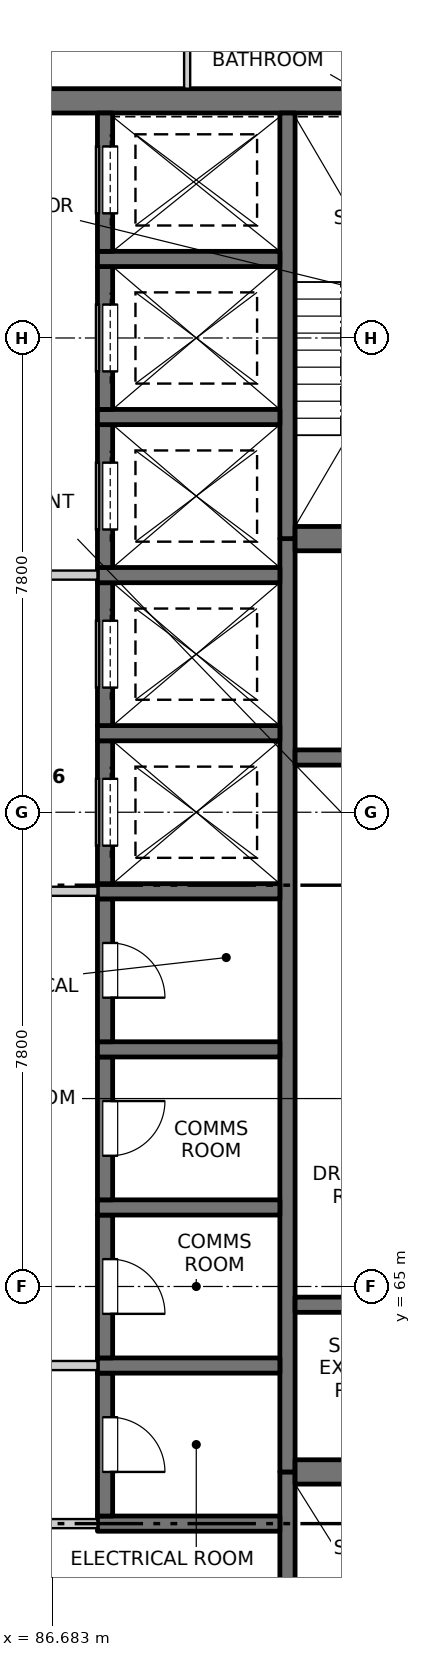
"""IFC4 building model, lengths in metres.
Left out: names, types, materials, properties, quantities, classifications, styles, units other than length and angle.
Written with IfcOpenShell. Run it as: python <this file> out.ifc"""

import sys

from ifc_helpers import new_model, si_unit, direction, frame, frame_2d, origin, place, context, subcontext, project, spatial, rectangle, extrude, element, fill, save


model = new_model("IFC4")
c1 = context("Model", 3, precision=1e-05, world=origin(), true_north=direction((0.0, 1.0)))
c2 = subcontext(c1, "Body", "Model", "MODEL_VIEW")
j1 = project(units=[si_unit("LENGTHUNIT", "METRE"), si_unit("PLANEANGLEUNIT", "RADIAN")], contexts=[c1])
p1 = place(None, origin())
s1 = spatial("IfcSite", under=j1, at=p1, CompositionType="ELEMENT")
p2 = place(p1, origin())
s2 = spatial("IfcBuilding", under=s1, at=p2, CompositionType="ELEMENT")
p3 = place(p2, frame((0.0, 0.0, 238.1)))
s3 = spatial("IfcBuildingStorey", under=s2, at=p3, CompositionType="ELEMENT", Elevation=238.1)
p4 = place(p3, frame((75.45, 84.5, -0.25), z_axis=(0.0, 0.0, 1.0), x_axis=(1.0, 0.0, 0.0)))
e1 = element("IfcWall", 1, at=p4, inside=s3, PredefinedType="SOLIDWALL", context=c2, shape_type="SweptSolid", body=[
    extrude(rectangle(XDim=19.1, YDim=0.4, at=frame_2d((9.55, 0.0))), origin(), (0.0, 0.0, 1.0), 3.35),
])
p5 = place(p3, frame((90.55, 55.45, -0.25), z_axis=(0.0, 0.0, 1.0), x_axis=(0.0, 1.0, 0.0)))
e2 = element("IfcWall", 2, at=p5, inside=s3, PredefinedType="SOLIDWALL", context=c2, shape_type="SweptSolid", body=[
    extrude(rectangle(XDim=6.5, YDim=0.25, at=frame_2d((3.25, 0.0))), origin(), (0.0, 0.0, 1.0), 3.35),
])
p6 = place(p3, frame((90.55, 61.95, -0.25), z_axis=(0.0, 0.0, 1.0), x_axis=(0.0, 1.0, 0.0)))
e3 = element("IfcWall", 3, at=p6, inside=s3, PredefinedType="SOLIDWALL", context=c2, shape_type="SweptSolid", body=[
    extrude(rectangle(XDim=15.35, YDim=0.25, at=frame_2d((7.675, 0.0))), origin(), (0.0, 0.0, 1.0), 3.35),
])
p7 = place(p3, frame((90.55, 77.3, -0.25), z_axis=(0.0, 0.0, 1.0), x_axis=(0.0, 1.0, 0.0)))
e4 = element("IfcWall", 4, at=p7, inside=s3, PredefinedType="SOLIDWALL", context=c2, shape_type="SweptSolid", body=[
    extrude(rectangle(XDim=7.0, YDim=0.25, at=frame_2d((3.5, 0.0))), origin(), (0.0, 0.0, 1.0), 3.35),
])
p8 = place(p3, frame((87.425, 61.1, -0.25), z_axis=(0.0, 0.0, 1.0), x_axis=(1.0, 0.0, 0.0)))
e5 = element("IfcWall", 5, at=p8, inside=s3, PredefinedType="SOLIDWALL", context=c2, shape_type="SweptSolid", body=[
    extrude(rectangle(XDim=3.0, YDim=0.25, at=frame_2d((1.5, 0.0))), origin(), (0.0, 0.0, 1.0), 3.35),
])
p9 = place(p3, frame((87.55, 61.225, -0.25), z_axis=(0.0, 0.0, 1.0), x_axis=(0.0, 1.0, 0.0)))
e6 = element("IfcWall", 6, at=p9, inside=s3, PredefinedType="SOLIDWALL", context=c2, shape_type="SweptSolid", body=[
    extrude(rectangle(XDim=2.35, YDim=0.25, at=frame_2d((1.175, 0.0))), origin(), (0.0, 0.0, 1.0), 3.35),
])
p10 = place(p9, frame((0.725, 0.0, 0.25)))
e7 = element("IfcOpeningElement", 7, at=p10, cuts=e6, PredefinedType="OPENING", context=c2, shape_type="SweptSolid", body=[
    extrude(rectangle(XDim=0.9, YDim=2.1, at=frame_2d((0.45, 1.05))), frame((0.0, 0.135, 0.0), z_axis=(0.0, -1.0, 0.0), x_axis=(1.0, 0.0, 0.0)), (0.0, 0.0, 1.0), 0.27),
])
p11 = place(p3, frame((87.425, 63.7, -0.25), z_axis=(0.0, 0.0, 1.0), x_axis=(1.0, 0.0, 0.0)))
e8 = element("IfcWall", 8, at=p11, inside=s3, PredefinedType="SOLIDWALL", context=c2, shape_type="SweptSolid", body=[
    extrude(rectangle(XDim=3.0, YDim=0.25, at=frame_2d((1.5, 0.0))), origin(), (0.0, 0.0, 1.0), 3.35),
])
p12 = place(p3, frame((87.55, 63.825, -0.25), z_axis=(0.0, 0.0, 1.0), x_axis=(0.0, 1.0, 0.0)))
e9 = element("IfcWall", 9, at=p12, inside=s3, PredefinedType="SOLIDWALL", context=c2, shape_type="SweptSolid", body=[
    extrude(rectangle(XDim=2.35, YDim=0.25, at=frame_2d((1.175, 0.0))), origin(), (0.0, 0.0, 1.0), 3.35),
])
p13 = place(p12, frame((0.725, 0.0, 0.25)))
e10 = element("IfcOpeningElement", 10, at=p13, cuts=e9, PredefinedType="OPENING", context=c2, shape_type="SweptSolid", body=[
    extrude(rectangle(XDim=0.9, YDim=2.1, at=frame_2d((0.45, 1.05))), frame((0.0, 0.135, 0.0), z_axis=(0.0, -1.0, 0.0), x_axis=(1.0, 0.0, 0.0)), (0.0, 0.0, 1.0), 0.27),
])
p14 = place(p3, frame((87.425, 66.3, -0.25), z_axis=(0.0, 0.0, 1.0), x_axis=(1.0, 0.0, 0.0)))
e11 = element("IfcWall", 11, at=p14, inside=s3, PredefinedType="SOLIDWALL", context=c2, shape_type="SweptSolid", body=[
    extrude(rectangle(XDim=3.0, YDim=0.25, at=frame_2d((1.5, 0.0))), origin(), (0.0, 0.0, 1.0), 3.35),
])
p15 = place(p3, frame((87.55, 66.425, -0.25), z_axis=(0.0, 0.0, 1.0), x_axis=(0.0, 1.0, 0.0)))
e12 = element("IfcWall", 12, at=p15, inside=s3, PredefinedType="SOLIDWALL", context=c2, shape_type="SweptSolid", body=[
    extrude(rectangle(XDim=2.35, YDim=0.25, at=frame_2d((1.175, 0.0))), origin(), (0.0, 0.0, 1.0), 3.35),
])
p16 = place(p15, frame((0.725, 0.0, 0.25)))
e13 = element("IfcOpeningElement", 13, at=p16, cuts=e12, PredefinedType="OPENING", context=c2, shape_type="SweptSolid", body=[
    extrude(rectangle(XDim=0.9, YDim=2.1, at=frame_2d((0.45, 1.05))), frame((0.0, 0.135, 0.0), z_axis=(0.0, -1.0, 0.0), x_axis=(1.0, 0.0, 0.0)), (0.0, 0.0, 1.0), 0.27),
])
p17 = place(p3, frame((87.425, 68.9, -0.25), z_axis=(0.0, 0.0, 1.0), x_axis=(1.0, 0.0, 0.0)))
e14 = element("IfcWall", 14, at=p17, inside=s3, PredefinedType="SOLIDWALL", context=c2, shape_type="SweptSolid", body=[
    extrude(rectangle(XDim=3.0, YDim=0.25, at=frame_2d((1.5, 0.0))), origin(), (0.0, 0.0, 1.0), 3.35),
])
p18 = place(p3, frame((87.55, 69.025, -0.25), z_axis=(0.0, 0.0, 1.0), x_axis=(0.0, 1.0, 0.0)))
e15 = element("IfcWall", 15, at=p18, inside=s3, PredefinedType="SOLIDWALL", context=c2, shape_type="SweptSolid", body=[
    extrude(rectangle(XDim=2.35, YDim=0.25, at=frame_2d((1.175, 0.0))), origin(), (0.0, 0.0, 1.0), 3.35),
])
p19 = place(p18, frame((0.725, 0.0, 0.25)))
e16 = element("IfcOpeningElement", 16, at=p19, cuts=e15, PredefinedType="OPENING", context=c2, shape_type="SweptSolid", body=[
    extrude(rectangle(XDim=0.9, YDim=2.1, at=frame_2d((0.45, 1.05))), frame((0.0, 0.135, 0.0), z_axis=(0.0, -1.0, 0.0), x_axis=(1.0, 0.0, 0.0)), (0.0, 0.0, 1.0), 0.27),
])
p20 = place(p3, frame((87.425, 71.5, -0.25), z_axis=(0.0, 0.0, 1.0), x_axis=(1.0, 0.0, 0.0)))
e17 = element("IfcWall", 17, at=p20, inside=s3, PredefinedType="SOLIDWALL", context=c2, shape_type="SweptSolid", body=[
    extrude(rectangle(XDim=3.0, YDim=0.25, at=frame_2d((1.5, 0.0))), origin(), (0.0, 0.0, 1.0), 3.35),
])
p21 = place(p3, frame((87.55, 71.625, -0.25), z_axis=(0.0, 0.0, 1.0), x_axis=(0.0, 1.0, 0.0)))
e18 = element("IfcWall", 18, at=p21, inside=s3, PredefinedType="SOLIDWALL", context=c2, shape_type="SweptSolid", body=[
    extrude(rectangle(XDim=2.35, YDim=0.25, at=frame_2d((1.175, 0.0))), origin(), (0.0, 0.0, 1.0), 3.35),
])
p22 = place(p21, frame((0.625, 0.0, 0.25)))
e19 = element("IfcOpeningElement", 19, at=p22, cuts=e18, PredefinedType="OPENING", context=c2, shape_type="SweptSolid", body=[
    extrude(rectangle(XDim=1.1, YDim=2.1, at=frame_2d((0.55, 1.05))), frame((0.0, 0.135, 0.0), z_axis=(0.0, -1.0, 0.0), x_axis=(1.0, 0.0, 0.0)), (0.0, 0.0, 1.0), 0.27),
])
p23 = place(p3, frame((87.425, 74.1, -0.25), z_axis=(0.0, 0.0, 1.0), x_axis=(1.0, 0.0, 0.0)))
e20 = element("IfcWall", 20, at=p23, inside=s3, PredefinedType="SOLIDWALL", context=c2, shape_type="SweptSolid", body=[
    extrude(rectangle(XDim=3.0, YDim=0.25, at=frame_2d((1.5, 0.0))), origin(), (0.0, 0.0, 1.0), 3.35),
])
p24 = place(p3, frame((87.55, 74.225, -0.25), z_axis=(0.0, 0.0, 1.0), x_axis=(0.0, 1.0, 0.0)))
e21 = element("IfcWall", 21, at=p24, inside=s3, PredefinedType="SOLIDWALL", context=c2, shape_type="SweptSolid", body=[
    extrude(rectangle(XDim=2.35, YDim=0.25, at=frame_2d((1.175, 0.0))), origin(), (0.0, 0.0, 1.0), 3.35),
])
p25 = place(p24, frame((0.625, 0.0, 0.25)))
e22 = element("IfcOpeningElement", 22, at=p25, cuts=e21, PredefinedType="OPENING", context=c2, shape_type="SweptSolid", body=[
    extrude(rectangle(XDim=1.1, YDim=2.1, at=frame_2d((0.55, 1.05))), frame((0.0, 0.135, 0.0), z_axis=(0.0, -1.0, 0.0), x_axis=(1.0, 0.0, 0.0)), (0.0, 0.0, 1.0), 0.27),
])
p26 = place(p3, frame((87.425, 76.7, -0.25), z_axis=(0.0, 0.0, 1.0), x_axis=(1.0, 0.0, 0.0)))
e23 = element("IfcWall", 23, at=p26, inside=s3, PredefinedType="SOLIDWALL", context=c2, shape_type="SweptSolid", body=[
    extrude(rectangle(XDim=3.0, YDim=0.25, at=frame_2d((1.5, 0.0))), origin(), (0.0, 0.0, 1.0), 3.35),
])
p27 = place(p3, frame((87.55, 76.825, -0.25), z_axis=(0.0, 0.0, 1.0), x_axis=(0.0, 1.0, 0.0)))
e24 = element("IfcWall", 24, at=p27, inside=s3, PredefinedType="SOLIDWALL", context=c2, shape_type="SweptSolid", body=[
    extrude(rectangle(XDim=2.35, YDim=0.25, at=frame_2d((1.175, 0.0))), origin(), (0.0, 0.0, 1.0), 3.35),
])
p28 = place(p27, frame((0.625, 0.0, 0.25)))
e25 = element("IfcOpeningElement", 25, at=p28, cuts=e24, PredefinedType="OPENING", context=c2, shape_type="SweptSolid", body=[
    extrude(rectangle(XDim=1.1, YDim=2.1, at=frame_2d((0.55, 1.05))), frame((0.0, 0.135, 0.0), z_axis=(0.0, -1.0, 0.0), x_axis=(1.0, 0.0, 0.0)), (0.0, 0.0, 1.0), 0.27),
])
p29 = place(p3, frame((87.425, 79.3, -0.25), z_axis=(0.0, 0.0, 1.0), x_axis=(1.0, 0.0, 0.0)))
e26 = element("IfcWall", 26, at=p29, inside=s3, PredefinedType="SOLIDWALL", context=c2, shape_type="SweptSolid", body=[
    extrude(rectangle(XDim=3.0, YDim=0.25, at=frame_2d((1.5, 0.0))), origin(), (0.0, 0.0, 1.0), 3.35),
])
p30 = place(p3, frame((87.55, 79.425, -0.25), z_axis=(0.0, 0.0, 1.0), x_axis=(0.0, 1.0, 0.0)))
e27 = element("IfcWall", 27, at=p30, inside=s3, PredefinedType="SOLIDWALL", context=c2, shape_type="SweptSolid", body=[
    extrude(rectangle(XDim=2.35, YDim=0.25, at=frame_2d((1.175, 0.0))), origin(), (0.0, 0.0, 1.0), 3.35),
])
p31 = place(p30, frame((0.625, 0.0, 0.25)))
e28 = element("IfcOpeningElement", 28, at=p31, cuts=e27, PredefinedType="OPENING", context=c2, shape_type="SweptSolid", body=[
    extrude(rectangle(XDim=1.1, YDim=2.1, at=frame_2d((0.55, 1.05))), frame((0.0, 0.135, 0.0), z_axis=(0.0, -1.0, 0.0), x_axis=(1.0, 0.0, 0.0)), (0.0, 0.0, 1.0), 0.27),
])
p32 = place(p3, frame((87.425, 81.9, -0.25), z_axis=(0.0, 0.0, 1.0), x_axis=(1.0, 0.0, 0.0)))
e29 = element("IfcWall", 29, at=p32, inside=s3, PredefinedType="SOLIDWALL", context=c2, shape_type="SweptSolid", body=[
    extrude(rectangle(XDim=3.0, YDim=0.25, at=frame_2d((1.5, 0.0))), origin(), (0.0, 0.0, 1.0), 3.35),
])
p33 = place(p3, frame((87.55, 82.025, -0.25), z_axis=(0.0, 0.0, 1.0), x_axis=(0.0, 1.0, 0.0)))
e30 = element("IfcWall", 30, at=p33, inside=s3, PredefinedType="SOLIDWALL", context=c2, shape_type="SweptSolid", body=[
    extrude(rectangle(XDim=2.275, YDim=0.25, at=frame_2d((1.138, 0.0))), origin(), (0.0, 0.0, 1.0), 3.35),
])
p34 = place(p33, frame((0.625, 0.0, 0.25)))
e31 = element("IfcOpeningElement", 31, at=p34, cuts=e30, PredefinedType="OPENING", context=c2, shape_type="SweptSolid", body=[
    extrude(rectangle(XDim=1.1, YDim=2.1, at=frame_2d((0.55, 1.05))), frame((0.0, 0.135, 0.0), z_axis=(0.0, -1.0, 0.0), x_axis=(1.0, 0.0, 0.0)), (0.0, 0.0, 1.0), 0.27),
])
p35 = place(p3, frame((90.675, 61.95, -0.25), z_axis=(0.0, 0.0, 1.0), x_axis=(1.0, 0.0, 0.0)))
e32 = element("IfcWall", 32, at=p35, inside=s3, PredefinedType="SOLIDWALL", context=c2, shape_type="SweptSolid", body=[
    extrude(rectangle(XDim=3.875, YDim=0.4, at=frame_2d((1.938, 0.0))), origin(), (0.0, 0.0, 1.0), 3.35),
])
for number, where, z_axis, x_axis in (
    (33, (90.675, 64.7, -0.25), (0.0, 0.0, 1.0), (1.0, 0.0, 0.0)),
    (34, (90.675, 73.7, -0.25), (0.0, 0.0, 1.0), (1.0, 0.0, 0.0)),
):
    element("IfcWall", number, at=place(p3, frame(where, z_axis=z_axis, x_axis=x_axis)), inside=s3, PredefinedType="SOLIDWALL", context=c2, shape_type="SweptSolid", body=[
        extrude(rectangle(XDim=3.875, YDim=0.25, at=frame_2d((1.938, 0.0))), origin(), (0.0, 0.0, 1.0), 3.35),
    ])
p36 = place(p3, frame((90.675, 77.3, -0.25), z_axis=(0.0, 0.0, 1.0), x_axis=(1.0, 0.0, 0.0)))
e35 = element("IfcWall", 35, at=p36, inside=s3, PredefinedType="SOLIDWALL", context=c2, shape_type="SweptSolid", body=[
    extrude(rectangle(XDim=3.875, YDim=0.4, at=frame_2d((1.938, 0.0))), origin(), (0.0, 0.0, 1.0), 3.35),
])
p37 = place(p3, frame((82.575, 61.1, 0.0), z_axis=(0.0, 0.0, 1.0), x_axis=(1.0, 0.0, 0.0)))
e36 = element("IfcWall", 36, at=p37, inside=s3, PredefinedType="PARTITIONING", context=c2, shape_type="SweptSolid", body=[
    extrude(rectangle(XDim=4.85, YDim=0.15, at=frame_2d((2.425, 0.0))), origin(), (0.0, 0.0, 1.0), 3.1),
])
p38 = place(p37, frame((1.525, 0.0, 0.0)))
e37 = element("IfcOpeningElement", 37, at=p38, cuts=e36, PredefinedType="OPENING", context=c2, shape_type="SweptSolid", body=[
    extrude(rectangle(XDim=1.8, YDim=2.1, at=frame_2d((0.9, 1.05))), frame((0.0, 0.085, 0.0), z_axis=(0.0, -1.0, 0.0), x_axis=(1.0, 0.0, 0.0)), (0.0, 0.0, 1.0), 0.17),
])
p39 = place(p3, frame((82.575, 63.7, 0.0), z_axis=(0.0, 0.0, 1.0), x_axis=(1.0, 0.0, 0.0)))
e38 = element("IfcWall", 38, at=p39, inside=s3, PredefinedType="PARTITIONING", context=c2, shape_type="SweptSolid", body=[
    extrude(rectangle(XDim=4.85, YDim=0.15, at=frame_2d((2.425, 0.0))), origin(), (0.0, 0.0, 1.0), 3.1),
])
p40 = place(p39, frame((1.525, 0.0, 0.0)))
e39 = element("IfcOpeningElement", 39, at=p40, cuts=e38, PredefinedType="OPENING", context=c2, shape_type="SweptSolid", body=[
    extrude(rectangle(XDim=1.8, YDim=2.1, at=frame_2d((0.9, 1.05))), frame((0.0, 0.085, 0.0), z_axis=(0.0, -1.0, 0.0), x_axis=(1.0, 0.0, 0.0)), (0.0, 0.0, 1.0), 0.17),
])
p41 = place(p3, frame((82.575, 71.5, 0.0), z_axis=(0.0, 0.0, 1.0), x_axis=(1.0, 0.0, 0.0)))
e40 = element("IfcWall", 40, at=p41, inside=s3, PredefinedType="PARTITIONING", context=c2, shape_type="SweptSolid", body=[
    extrude(rectangle(XDim=4.85, YDim=0.15, at=frame_2d((2.425, 0.0))), origin(), (0.0, 0.0, 1.0), 3.1),
])
p42 = place(p41, frame((1.525, 0.0, 0.0)))
e41 = element("IfcOpeningElement", 41, at=p42, cuts=e40, PredefinedType="OPENING", context=c2, shape_type="SweptSolid", body=[
    extrude(rectangle(XDim=1.8, YDim=2.1, at=frame_2d((0.9, 1.05))), frame((0.0, 0.085, 0.0), z_axis=(0.0, -1.0, 0.0), x_axis=(1.0, 0.0, 0.0)), (0.0, 0.0, 1.0), 0.17),
])
p43 = place(p3, frame((82.575, 76.7, 0.0), z_axis=(0.0, 0.0, 1.0), x_axis=(1.0, 0.0, 0.0)))
e42 = element("IfcWall", 42, at=p43, inside=s3, PredefinedType="PARTITIONING", context=c2, shape_type="SweptSolid", body=[
    extrude(rectangle(XDim=4.85, YDim=0.15, at=frame_2d((2.425, 0.0))), origin(), (0.0, 0.0, 1.0), 3.1),
])
p44 = place(p43, frame((1.525, 0.0, 0.0)))
e43 = element("IfcOpeningElement", 43, at=p44, cuts=e42, PredefinedType="OPENING", context=c2, shape_type="SweptSolid", body=[
    extrude(rectangle(XDim=1.8, YDim=2.1, at=frame_2d((0.9, 1.05))), frame((0.0, 0.085, 0.0), z_axis=(0.0, -1.0, 0.0), x_axis=(1.0, 0.0, 0.0)), (0.0, 0.0, 1.0), 0.17),
])
p45 = place(p3, frame((88.9, 84.7, 0.0), z_axis=(0.0, 0.0, 1.0), x_axis=(0.0, 1.0, 0.0)))
e44 = element("IfcWall", 44, at=p45, inside=s3, PredefinedType="PARTITIONING", context=c2, shape_type="SweptSolid", body=[
    extrude(rectangle(XDim=3.4, YDim=0.1, at=frame_2d((1.7, 0.0))), origin(), (0.0, 0.0, 1.0), 3.1),
])
p46 = place(p45, frame((1.3, 0.0, 0.0)))
e45 = element("IfcOpeningElement", 45, at=p46, cuts=e44, PredefinedType="OPENING", context=c2, shape_type="SweptSolid", body=[
    extrude(rectangle(XDim=0.9, YDim=2.1, at=frame_2d((0.45, 1.05))), frame((0.0, 0.06, 0.0), z_axis=(0.0, -1.0, 0.0), x_axis=(1.0, 0.0, 0.0)), (0.0, 0.0, 1.0), 0.12),
])
p47 = place(p10, origin())
e46 = element("IfcDoor", 46, at=p47, inside=s3, OperationType="SINGLE_SWING_RIGHT", PredefinedType="DOOR", context=c2, shape_type="SweptSolid", body=[
    extrude(rectangle(XDim=0.9, YDim=2.1, at=frame_2d((0.45, 1.05))), frame((0.0, -0.06, 0.0), z_axis=(0.0, -1.0, 0.0), x_axis=(1.0, 0.0, 0.0)), (0.0, 0.0, 1.0), 0.05),
])
fill(e7, e46)
p48 = place(p13, origin())
e47 = element("IfcDoor", 47, at=p48, inside=s3, OperationType="SINGLE_SWING_RIGHT", PredefinedType="DOOR", context=c2, shape_type="SweptSolid", body=[
    extrude(rectangle(XDim=0.9, YDim=2.1, at=frame_2d((0.45, 1.05))), frame((0.0, -0.06, 0.0), z_axis=(0.0, -1.0, 0.0), x_axis=(1.0, 0.0, 0.0)), (0.0, 0.0, 1.0), 0.05),
])
fill(e10, e47)
p49 = place(p16, origin())
e48 = element("IfcDoor", 48, at=p49, inside=s3, OperationType="SINGLE_SWING_LEFT", PredefinedType="DOOR", context=c2, shape_type="SweptSolid", body=[
    extrude(rectangle(XDim=0.9, YDim=2.1, at=frame_2d((0.45, 1.05))), frame((0.0, -0.06, 0.0), z_axis=(0.0, -1.0, 0.0), x_axis=(1.0, 0.0, 0.0)), (0.0, 0.0, 1.0), 0.05),
])
fill(e13, e48)
p50 = place(p19, origin())
e49 = element("IfcDoor", 49, at=p50, inside=s3, OperationType="SINGLE_SWING_RIGHT", PredefinedType="DOOR", context=c2, shape_type="SweptSolid", body=[
    extrude(rectangle(XDim=0.9, YDim=2.1, at=frame_2d((0.45, 1.05))), frame((0.0, -0.06, 0.0), z_axis=(0.0, -1.0, 0.0), x_axis=(1.0, 0.0, 0.0)), (0.0, 0.0, 1.0), 0.05),
])
fill(e16, e49)
p51 = place(p22, origin())
e50 = element("IfcDoor", 50, at=p51, inside=s3, OperationType="SLIDING_TO_LEFT", PredefinedType="DOOR", context=c2, shape_type="SweptSolid", body=[
    extrude(rectangle(XDim=1.1, YDim=2.1, at=frame_2d((0.55, 1.05))), frame((0.0, -0.06, 0.0), z_axis=(0.0, -1.0, 0.0), x_axis=(1.0, 0.0, 0.0)), (0.0, 0.0, 1.0), 0.05),
])
fill(e19, e50)
p52 = place(p25, origin())
e51 = element("IfcDoor", 51, at=p52, inside=s3, OperationType="SLIDING_TO_LEFT", PredefinedType="DOOR", context=c2, shape_type="SweptSolid", body=[
    extrude(rectangle(XDim=1.1, YDim=2.1, at=frame_2d((0.55, 1.05))), frame((0.0, -0.06, 0.0), z_axis=(0.0, -1.0, 0.0), x_axis=(1.0, 0.0, 0.0)), (0.0, 0.0, 1.0), 0.05),
])
fill(e22, e51)
p53 = place(p28, origin())
e52 = element("IfcDoor", 52, at=p53, inside=s3, OperationType="SLIDING_TO_LEFT", PredefinedType="DOOR", context=c2, shape_type="SweptSolid", body=[
    extrude(rectangle(XDim=1.1, YDim=2.1, at=frame_2d((0.55, 1.05))), frame((0.0, -0.06, 0.0), z_axis=(0.0, -1.0, 0.0), x_axis=(1.0, 0.0, 0.0)), (0.0, 0.0, 1.0), 0.05),
])
fill(e25, e52)
p54 = place(p31, origin())
e53 = element("IfcDoor", 53, at=p54, inside=s3, OperationType="SLIDING_TO_RIGHT", PredefinedType="DOOR", context=c2, shape_type="SweptSolid", body=[
    extrude(rectangle(XDim=1.1, YDim=2.1, at=frame_2d((0.55, 1.05))), frame((0.0, -0.06, 0.0), z_axis=(0.0, -1.0, 0.0), x_axis=(1.0, 0.0, 0.0)), (0.0, 0.0, 1.0), 0.05),
])
fill(e28, e53)
p55 = place(p34, origin())
e54 = element("IfcDoor", 54, at=p55, inside=s3, OperationType="SLIDING_TO_RIGHT", PredefinedType="DOOR", context=c2, shape_type="SweptSolid", body=[
    extrude(rectangle(XDim=1.1, YDim=2.1, at=frame_2d((0.55, 1.05))), frame((0.0, -0.06, 0.0), z_axis=(0.0, -1.0, 0.0), x_axis=(1.0, 0.0, 0.0)), (0.0, 0.0, 1.0), 0.05),
])
fill(e31, e54)
save(model, sys.argv[1])
